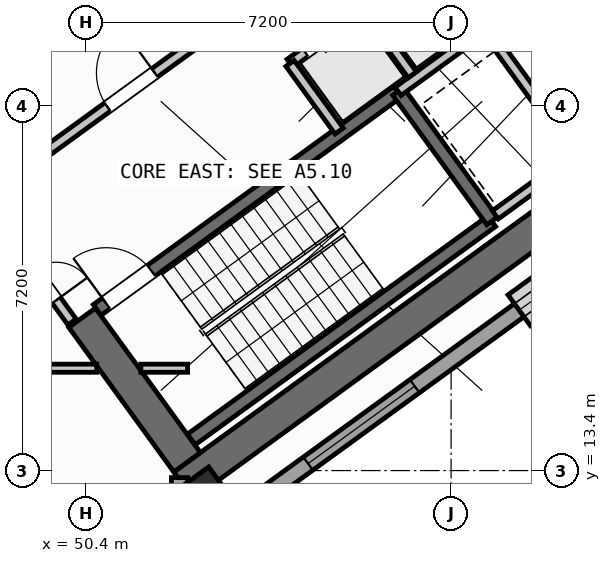
"""IFC4 building model, lengths in metres.
Left out: names, types, materials, properties, quantities, classifications, styles, units other than length and angle.
Written with IfcOpenShell. Run it as: python <this file> out.ifc"""

import sys

from ifc_helpers import new_model, si_unit, direction, frame, frame_2d, origin, origin_2d, place, context, subcontext, project, spatial, rectangle, hollow_rectangle, extrude, source, transform, mapped, element, fill, save


model = new_model("IFC4")
c1 = context("Model", 3, precision=1e-05, world=origin(), true_north=direction((0.0, 1.0)))
c2 = subcontext(c1, "Body", "Model", "MODEL_VIEW")
j1 = project(units=[si_unit("LENGTHUNIT", "METRE"), si_unit("PLANEANGLEUNIT", "RADIAN")], contexts=[c1])
p1 = place(None, origin())
s1 = spatial("IfcSite", under=j1, at=p1, CompositionType="ELEMENT")
p2 = place(p1, origin())
s2 = spatial("IfcBuilding", under=s1, at=p2, CompositionType="ELEMENT")
p3 = place(p2, frame((0.0, 0.0, 76.5)))
s3 = spatial("IfcBuildingStorey", under=s2, at=p3, CompositionType="ELEMENT", Elevation=76.5)
p4 = place(p3, frame((52.318, 13.11, 0.0), z_axis=(0.0, 0.0, 1.0), x_axis=(0.809019445368, 0.587781878776, 0.0)))
e1 = element("IfcWall", 1, at=p4, inside=s3, PredefinedType="SHEAR", context=c2, shape_type="SweptSolid", body=[
    extrude(rectangle(XDim=12.44, YDim=0.65, at=frame_2d((6.22, 0.0))), origin(), (0.0, 0.0, 1.0), 4.25),
])
p5 = place(p3, frame((52.39, 13.564, 0.0), z_axis=(0.0, 0.0, 1.0), x_axis=(-0.58779688989, 0.809008539037, 0.0)))
e2 = element("IfcWall", 2, at=p5, inside=s3, PredefinedType="SHEAR", context=c2, shape_type="SweptSolid", body=[
    extrude(rectangle(XDim=3.525, YDim=0.65, at=frame_2d((1.763, 0.0))), origin(), (0.0, 0.0, 1.0), 4.25),
])
m1 = source(origin(), c2, "Body", "SweptSolid", [
    extrude(hollow_rectangle(XDim=1.0, YDim=1.0, WallThickness=0.04, at=origin_2d()), origin(), (0.0, 0.0, 1.0), 4.5),
])
p6 = place(p3, frame((52.705, 12.773, 0.0), z_axis=(0.0, 0.0, 1.0), x_axis=(0.809016994375, 0.587785252292, 0.0)))
e3 = element("IfcColumn", 3, at=p6, inside=s3, PredefinedType="COLUMN", context=c2, shape_type="MappedRepresentation", body=[
    mapped(m1, transform((0.0, 0.0, 0.0), scale=1.0)),
])
p7 = place(p3, frame((67.454, 22.747, 0.0), z_axis=(0.0, 0.0, 1.0), x_axis=(-0.809021120468, -0.587779573171, 0.0)))
e4 = element("IfcWall", 4, at=p7, inside=s3, PredefinedType="STANDARD", context=c2, shape_type="SweptSolid", body=[
    extrude(rectangle(XDim=17.588, YDim=0.32, at=frame_2d((8.794, 0.0))), origin(), (0.0, 0.0, 1.0), 4.25),
])
p8 = place(p7, frame((1.624, 0.0, 0.0)))
e5 = element("IfcOpeningElement", 5, at=p8, cuts=e4, PredefinedType="OPENING", context=c2, shape_type="SweptSolid", body=[
    extrude(rectangle(XDim=1.05, YDim=2.15, at=frame_2d((0.525, 1.075))), frame((0.0, 0.17, 0.0), z_axis=(0.0, -1.0, 0.0), x_axis=(1.0, 0.0, 0.0)), (0.0, 0.0, 1.0), 0.34),
])
p9 = place(p7, frame((7.919, 0.0, 0.7)))
e6 = element("IfcOpeningElement", 6, at=p9, cuts=e4, PredefinedType="OPENING", context=c2, shape_type="SweptSolid", body=[
    extrude(rectangle(XDim=2.6, YDim=2.0, at=frame_2d((1.3, 1.0))), frame((0.0, 0.17, 0.0), z_axis=(0.0, -1.0, 0.0), x_axis=(1.0, 0.0, 0.0)), (0.0, 0.0, 1.0), 0.34),
])
p10 = place(p7, frame((13.069, 0.0, 0.7)))
e7 = element("IfcOpeningElement", 7, at=p10, cuts=e4, PredefinedType="OPENING", context=c2, shape_type="SweptSolid", body=[
    extrude(rectangle(XDim=2.6, YDim=2.0, at=frame_2d((1.3, 1.0))), frame((0.0, 0.17, 0.0), z_axis=(0.0, -1.0, 0.0), x_axis=(1.0, 0.0, 0.0)), (0.0, 0.0, 1.0), 0.34),
])
p11 = place(p3, frame((52.24, 13.261, 0.0), z_axis=(0.0, 0.0, 1.0), x_axis=(0.0, -1.0, 0.0)))
e8 = element("IfcWall", 8, at=p11, inside=s3, PredefinedType="STANDARD", context=c2, shape_type="SweptSolid", body=[
    extrude(rectangle(XDim=9.795, YDim=0.32, at=frame_2d((4.897, 0.0))), origin(), (0.0, 0.0, 1.0), 4.25),
])
p12 = place(p11, frame((2.099, 0.0, 0.7)))
e9 = element("IfcOpeningElement", 9, at=p12, cuts=e8, PredefinedType="OPENING", context=c2, shape_type="SweptSolid", body=[
    extrude(rectangle(XDim=2.6, YDim=2.0, at=frame_2d((1.3, 1.0))), frame((0.0, 0.17, 0.0), z_axis=(0.0, -1.0, 0.0), x_axis=(1.0, 0.0, 0.0)), (0.0, 0.0, 1.0), 0.34),
])
p13 = place(p11, frame((6.93, 0.0, 0.75)))
e10 = element("IfcOpeningElement", 10, at=p13, cuts=e8, PredefinedType="OPENING", context=c2, shape_type="SweptSolid", body=[
    extrude(rectangle(XDim=2.0, YDim=1.95, at=frame_2d((1.0, 0.975))), frame((0.0, 0.17, 0.0), z_axis=(0.0, -1.0, 0.0), x_axis=(1.0, 0.0, 0.0)), (0.0, 0.0, 1.0), 0.34),
])
p14 = place(p3, frame((52.472, 14.013, 0.0), z_axis=(0.0, 0.0, 1.0), x_axis=(0.809028366311, 0.587769599847, 0.0)))
e11 = element("IfcWall", 11, at=p14, inside=s3, PredefinedType="SHEAR", context=c2, shape_type="SweptSolid", body=[
    extrude(rectangle(XDim=7.33, YDim=0.26, at=frame_2d((3.665, 0.0))), origin(), (0.0, 0.0, 1.0), 4.25),
])
p15 = place(p3, frame((50.615, 16.57, 0.0), z_axis=(0.0, 0.0, 1.0), x_axis=(0.809028366311, 0.587769599847, 0.0)))
e12 = element("IfcWall", 12, at=p15, inside=s3, PredefinedType="SHEAR", context=c2, shape_type="SweptSolid", body=[
    extrude(rectangle(XDim=7.33, YDim=0.26, at=frame_2d((3.665, 0.0))), origin(), (0.0, 0.0, 1.0), 4.25),
])
p16 = place(p15, frame((0.22, 0.0, 0.0)))
e13 = element("IfcOpeningElement", 13, at=p16, cuts=e12, PredefinedType="OPENING", context=c2, shape_type="SweptSolid", body=[
    extrude(rectangle(XDim=1.1, YDim=2.1, at=frame_2d((0.55, 1.05))), frame((0.0, 0.14, 0.0), z_axis=(0.0, -1.0, 0.0), x_axis=(1.0, 0.0, 0.0)), (0.0, 0.0, 1.0), 0.28),
])
p17 = place(p3, frame((58.41, 18.327, 0.0), z_axis=(0.0, 0.0, 1.0), x_axis=(-0.58776738483, 0.809029975545, 0.0)))
e14 = element("IfcWall", 14, at=p17, inside=s3, PredefinedType="SHEAR", context=c2, shape_type="SweptSolid", body=[
    extrude(rectangle(XDim=3.16, YDim=0.26, at=frame_2d((1.58, 0.0))), origin(), (0.0, 0.0, 1.0), 4.25),
])
p18 = place(p3, frame((47.106, 21.437, 0.0), z_axis=(0.0, 0.0, 1.0), x_axis=(0.809012514015, 0.58779141893, 0.0)))
e15 = element("IfcWall", 15, at=p18, inside=s3, PredefinedType="STANDARD", context=c2, shape_type="SweptSolid", body=[
    extrude(rectangle(XDim=3.398, YDim=0.2, at=frame_2d((1.699, 0.0))), origin(), (0.0, 0.0, 1.0), 4.24),
])
p19 = place(p18, frame((0.408, 0.0, 0.0)))
e16 = element("IfcOpeningElement", 16, at=p19, cuts=e15, PredefinedType="OPENING", context=c2, shape_type="SweptSolid", body=[
    extrude(rectangle(XDim=1.3, YDim=2.2, at=frame_2d((0.65, 1.1))), frame((0.0, 0.11, 0.0), z_axis=(0.0, -1.0, 0.0), x_axis=(1.0, 0.0, 0.0)), (0.0, 0.0, 1.0), 0.22),
])
p20 = place(p3, frame((48.799, 19.107, 0.0), z_axis=(0.0, 0.0, 1.0), x_axis=(0.809012959416, 0.587790805897, 0.0)))
e17 = element("IfcWall", 17, at=p20, inside=s3, PredefinedType="STANDARD", context=c2, shape_type="SweptSolid", body=[
    extrude(rectangle(XDim=5.718, YDim=0.2, at=frame_2d((2.859, 0.0))), origin(), (0.0, 0.0, 1.0), 4.24),
])
p21 = place(p20, frame((2.498, 0.0, 0.0)))
e18 = element("IfcOpeningElement", 18, at=p21, cuts=e17, PredefinedType="OPENING", context=c2, shape_type="SweptSolid", body=[
    extrude(rectangle(XDim=1.15, YDim=2.1, at=frame_2d((0.575, 1.05))), frame((0.0, 0.11, 0.0), z_axis=(0.0, -1.0, 0.0), x_axis=(1.0, 0.0, 0.0)), (0.0, 0.0, 1.0), 0.22),
])
p22 = place(p3, frame((56.553, 20.884, 0.0), z_axis=(0.0, 0.0, 1.0), x_axis=(0.809035789462, 0.587759382205, 0.0)))
e19 = element("IfcWall", 19, at=p22, inside=s3, PredefinedType="STANDARD", context=c2, shape_type="SweptSolid", body=[
    extrude(rectangle(XDim=3.768, YDim=0.2, at=frame_2d((1.884, 0.0))), origin(), (0.0, 0.0, 1.0), 4.24),
])
p23 = place(p22, frame((2.65, 0.0, 0.0)))
e20 = element("IfcOpeningElement", 20, at=p23, cuts=e19, PredefinedType="OPENING", context=c2, shape_type="SweptSolid", body=[
    extrude(rectangle(XDim=0.86, YDim=2.05, at=frame_2d((0.43, 1.025))), frame((0.0, 0.11, 0.0), z_axis=(0.0, -1.0, 0.0), x_axis=(1.0, 0.0, 0.0)), (0.0, 0.0, 1.0), 0.22),
])
p24 = place(p3, frame((54.421, 21.436, 0.0), z_axis=(0.0, 0.0, 1.0), x_axis=(0.809013710463, 0.587789772183, 0.0)))
e21 = element("IfcWall", 21, at=p24, inside=s3, PredefinedType="STANDARD", context=c2, shape_type="SweptSolid", body=[
    extrude(rectangle(XDim=5.36, YDim=0.2, at=frame_2d((2.68, 0.0))), origin(), (0.0, 0.0, 1.0), 4.24),
])
p25 = place(p24, frame((0.37, 0.0, 0.0)))
e22 = element("IfcOpeningElement", 22, at=p25, cuts=e21, PredefinedType="OPENING", context=c2, shape_type="SweptSolid", body=[
    extrude(rectangle(XDim=1.1, YDim=2.15, at=frame_2d((0.55, 1.075))), frame((0.0, 0.11, 0.0), z_axis=(0.0, -1.0, 0.0), x_axis=(1.0, 0.0, 0.0)), (0.0, 0.0, 1.0), 0.22),
])
p26 = place(p24, frame((2.17, 0.0, 0.0)))
e23 = element("IfcOpeningElement", 23, at=p26, cuts=e21, PredefinedType="OPENING", context=c2, shape_type="SweptSolid", body=[
    extrude(rectangle(XDim=1.1, YDim=2.15, at=frame_2d((0.55, 1.075))), frame((0.0, 0.11, 0.0), z_axis=(0.0, -1.0, 0.0), x_axis=(1.0, 0.0, 0.0)), (0.0, 0.0, 1.0), 0.22),
])
p27 = place(p24, frame((3.97, 0.0, 0.0)))
e24 = element("IfcOpeningElement", 24, at=p27, cuts=e21, PredefinedType="OPENING", context=c2, shape_type="SweptSolid", body=[
    extrude(rectangle(XDim=1.1, YDim=2.15, at=frame_2d((0.55, 1.075))), frame((0.0, 0.11, 0.0), z_axis=(0.0, -1.0, 0.0), x_axis=(1.0, 0.0, 0.0)), (0.0, 0.0, 1.0), 0.22),
])
p28 = place(p3, frame((55.391, 20.102, 0.0), z_axis=(0.0, 0.0, 1.0), x_axis=(-0.58778447739, 0.809017557374, 0.0)))
e25 = element("IfcWall", 25, at=p28, inside=s3, PredefinedType="STANDARD", context=c2, shape_type="SweptSolid", body=[
    extrude(rectangle(XDim=1.65, YDim=0.2, at=frame_2d((0.825, 0.0))), origin(), (0.0, 0.0, 1.0), 4.24),
])
p29 = place(p3, frame((56.834, 21.212, 0.0), z_axis=(0.0, 0.0, 1.0), x_axis=(-0.58776738483, 0.809029975545, 0.0)))
e26 = element("IfcWall", 26, at=p29, inside=s3, PredefinedType="STANDARD", context=c2, shape_type="SweptSolid", body=[
    extrude(rectangle(XDim=1.58, YDim=0.2, at=frame_2d((0.79, 0.0))), origin(), (0.0, 0.0, 1.0), 4.24),
])
p30 = place(p3, frame((60.067, 19.655, 0.0), z_axis=(0.0, 0.0, 1.0), x_axis=(-0.587800520745, 0.809005900975, 0.0)))
e27 = element("IfcWall", 27, at=p30, inside=s3, PredefinedType="STANDARD", context=c2, shape_type="SweptSolid", body=[
    extrude(rectangle(XDim=2.66, YDim=0.2, at=frame_2d((1.33, 0.0))), origin(), (0.0, 0.0, 1.0), 4.24),
])
p31 = place(p3, frame((58.472, 18.447, 0.0), z_axis=(0.0, 0.0, 1.0), x_axis=(0.809022487728, 0.587777691266, 0.0)))
e28 = element("IfcWall", 28, at=p31, inside=s3, PredefinedType="STANDARD", context=c2, shape_type="SweptSolid", body=[
    extrude(rectangle(XDim=3.648, YDim=0.2, at=frame_2d((1.824, 0.0))), origin(), (0.0, 0.0, 1.0), 4.24),
])
p32 = place(p3, frame((35.296, 15.42, 0.0), z_axis=(0.0, 0.0, 1.0), x_axis=(1.0, 0.0, 0.0)))
e29 = element("IfcWall", 29, at=p32, inside=s3, PredefinedType="PARTITIONING", context=c2, shape_type="SweptSolid", body=[
    extrude(rectangle(XDim=15.311, YDim=0.16, at=frame_2d((7.655, 0.0))), origin(), (0.0, 0.0, 1.0), 4.24),
])
p33 = place(p32, frame((0.615, 0.0, 0.0)))
e30 = element("IfcOpeningElement", 30, at=p33, cuts=e29, PredefinedType="OPENING", context=c2, shape_type="SweptSolid", body=[
    extrude(rectangle(XDim=1.0, YDim=2.1, at=frame_2d((0.5, 1.05))), frame((0.0, 0.09, 0.0), z_axis=(0.0, -1.0, 0.0), x_axis=(1.0, 0.0, 0.0)), (0.0, 0.0, 1.0), 0.18),
])
p34 = place(p32, frame((9.035, 0.0, 0.0)))
e31 = element("IfcOpeningElement", 31, at=p34, cuts=e29, PredefinedType="OPENING", context=c2, shape_type="SweptSolid", body=[
    extrude(rectangle(XDim=1.0, YDim=2.1, at=frame_2d((0.5, 1.05))), frame((0.0, 0.09, 0.0), z_axis=(0.0, -1.0, 0.0), x_axis=(1.0, 0.0, 0.0)), (0.0, 0.0, 1.0), 0.18),
])
p35 = place(p3, frame((51.477, 15.42, 0.0), z_axis=(0.0, 0.0, 1.0), x_axis=(1.0, 0.0, 0.0)))
e32 = element("IfcWall", 32, at=p35, inside=s3, PredefinedType="PARTITIONING", context=c2, shape_type="SweptSolid", body=[
    extrude(rectangle(XDim=0.923, YDim=0.16, at=frame_2d((0.461, 0.0))), origin(), (0.0, 0.0, 1.0), 4.24),
])
p36 = place(p3, frame((50.119, 16.333, 0.0), z_axis=(0.0, 0.0, 1.0), x_axis=(-0.587749856981, 0.809042709391, 0.0)))
e33 = element("IfcWall", 33, at=p36, inside=s3, PredefinedType="STANDARD", context=c2, shape_type="SweptSolid", body=[
    extrude(rectangle(XDim=2.96, YDim=0.2, at=frame_2d((1.48, 0.0))), origin(), (0.0, 0.0, 1.0), 4.24),
])
p37 = place(p36, frame((0.53, 0.0, 0.0)))
e34 = element("IfcOpeningElement", 34, at=p37, cuts=e33, PredefinedType="OPENING", context=c2, shape_type="SweptSolid", body=[
    extrude(rectangle(XDim=1.5, YDim=2.15, at=frame_2d((0.75, 1.075))), frame((0.0, 0.11, 0.0), z_axis=(0.0, -1.0, 0.0), x_axis=(1.0, 0.0, 0.0)), (0.0, 0.0, 1.0), 0.22),
])
p38 = place(p3, frame((64.709, 20.938, 0.0), z_axis=(0.0, 0.0, 1.0), x_axis=(-0.58777828151, 0.809022058899, 0.0)))
e35 = element("IfcWall", 35, at=p38, inside=s3, PredefinedType="PARTITIONING", context=c2, shape_type="SweptSolid", body=[
    extrude(rectangle(XDim=21.7, YDim=0.16, at=frame_2d((10.85, 0.0))), origin(), (0.0, 0.0, 1.0), 4.24),
])
p39 = place(p38, frame((5.12, 0.0, 0.0)))
e36 = element("IfcOpeningElement", 36, at=p39, cuts=e35, PredefinedType="OPENING", context=c2, shape_type="SweptSolid", body=[
    extrude(rectangle(XDim=1.7, YDim=2.2, at=frame_2d((0.85, 1.1))), frame((0.0, 0.09, 0.0), z_axis=(0.0, -1.0, 0.0), x_axis=(1.0, 0.0, 0.0)), (0.0, 0.0, 1.0), 0.18),
])
m2 = source(origin(), c2, "Body", "SweptSolid", [
    extrude(rectangle(XDim=2.6, YDim=2.0, at=frame_2d((1.3, 1.0))), frame((0.0, 0.03, 0.0), z_axis=(0.0, -1.0, 0.0), x_axis=(1.0, 0.0, 0.0)), (0.0, 0.0, 1.0), 0.06),
])
p40 = place(p9, origin())
e37 = element("IfcWindow", 37, at=p40, inside=s3, PartitioningType="SINGLE_PANEL", PredefinedType="WINDOW", context=c2, shape_type="MappedRepresentation", body=[
    mapped(m2, transform((0.0, 0.0, 0.0), scale=1.0)),
])
fill(e6, e37)
p41 = place(p10, origin())
e38 = element("IfcWindow", 38, at=p41, inside=s3, PartitioningType="SINGLE_PANEL", PredefinedType="WINDOW", context=c2, shape_type="MappedRepresentation", body=[
    mapped(m2, transform((0.0, 0.0, 0.0), scale=1.0)),
])
fill(e7, e38)
m3 = source(origin(), c2, "Body", "SweptSolid", [
    extrude(rectangle(XDim=1.1, YDim=2.1, at=frame_2d((0.55, 1.05))), frame((0.0, 0.025, 0.0), z_axis=(0.0, -1.0, 0.0), x_axis=(1.0, 0.0, 0.0)), (0.0, 0.0, 1.0), 0.05),
])
p42 = place(p16, origin())
e39 = element("IfcDoor", 39, at=p42, inside=s3, OperationType="SINGLE_SWING_LEFT", PredefinedType="DOOR", context=c2, shape_type="MappedRepresentation", body=[
    mapped(m3, transform((0.0, 0.0, 0.0), scale=1.0)),
])
fill(e13, e39)
m4 = source(origin(), c2, "Body", "SweptSolid", [
    extrude(rectangle(XDim=1.15, YDim=2.1, at=frame_2d((0.575, 1.05))), frame((0.0, 0.025, 0.0), z_axis=(0.0, -1.0, 0.0), x_axis=(1.0, 0.0, 0.0)), (0.0, 0.0, 1.0), 0.05),
])
p43 = place(p21, origin())
e40 = element("IfcDoor", 40, at=p43, inside=s3, OperationType="SINGLE_SWING_RIGHT", PredefinedType="DOOR", context=c2, shape_type="MappedRepresentation", body=[
    mapped(m4, transform((0.0, 0.0, 0.0), scale=1.0)),
])
fill(e18, e40)
m5 = source(origin(), c2, "Body", "SweptSolid", [
    extrude(rectangle(XDim=1.1, YDim=2.15, at=frame_2d((0.55, 1.075))), frame((0.0, 0.025, 0.0), z_axis=(0.0, -1.0, 0.0), x_axis=(1.0, 0.0, 0.0)), (0.0, 0.0, 1.0), 0.05),
])
p44 = place(p25, origin())
e41 = element("IfcDoor", 41, at=p44, inside=s3, OperationType="DOUBLE_DOOR_SLIDING", PredefinedType="DOOR", context=c2, shape_type="MappedRepresentation", body=[
    mapped(m5, transform((0.0, 0.0, 0.0), scale=1.0)),
])
fill(e22, e41)
m6 = source(origin(), c2, "Body", "SweptSolid", [
    extrude(rectangle(XDim=1.5, YDim=2.15, at=frame_2d((0.75, 1.075))), frame((0.0, 0.025, 0.0), z_axis=(0.0, -1.0, 0.0), x_axis=(1.0, 0.0, 0.0)), (0.0, 0.0, 1.0), 0.05),
])
p45 = place(p37, frame((1.5, 0.0, 0.0), z_axis=(0.0, 0.0, 1.0), x_axis=(-1.0, 0.0, 0.0)))
e42 = element("IfcDoor", 42, at=p45, inside=s3, OperationType="DOUBLE_DOOR_SINGLE_SWING", PredefinedType="DOOR", context=c2, shape_type="MappedRepresentation", body=[
    mapped(m6, transform((0.0, 0.0, 0.0), scale=1.0)),
])
fill(e34, e42)
save(model, sys.argv[1])
